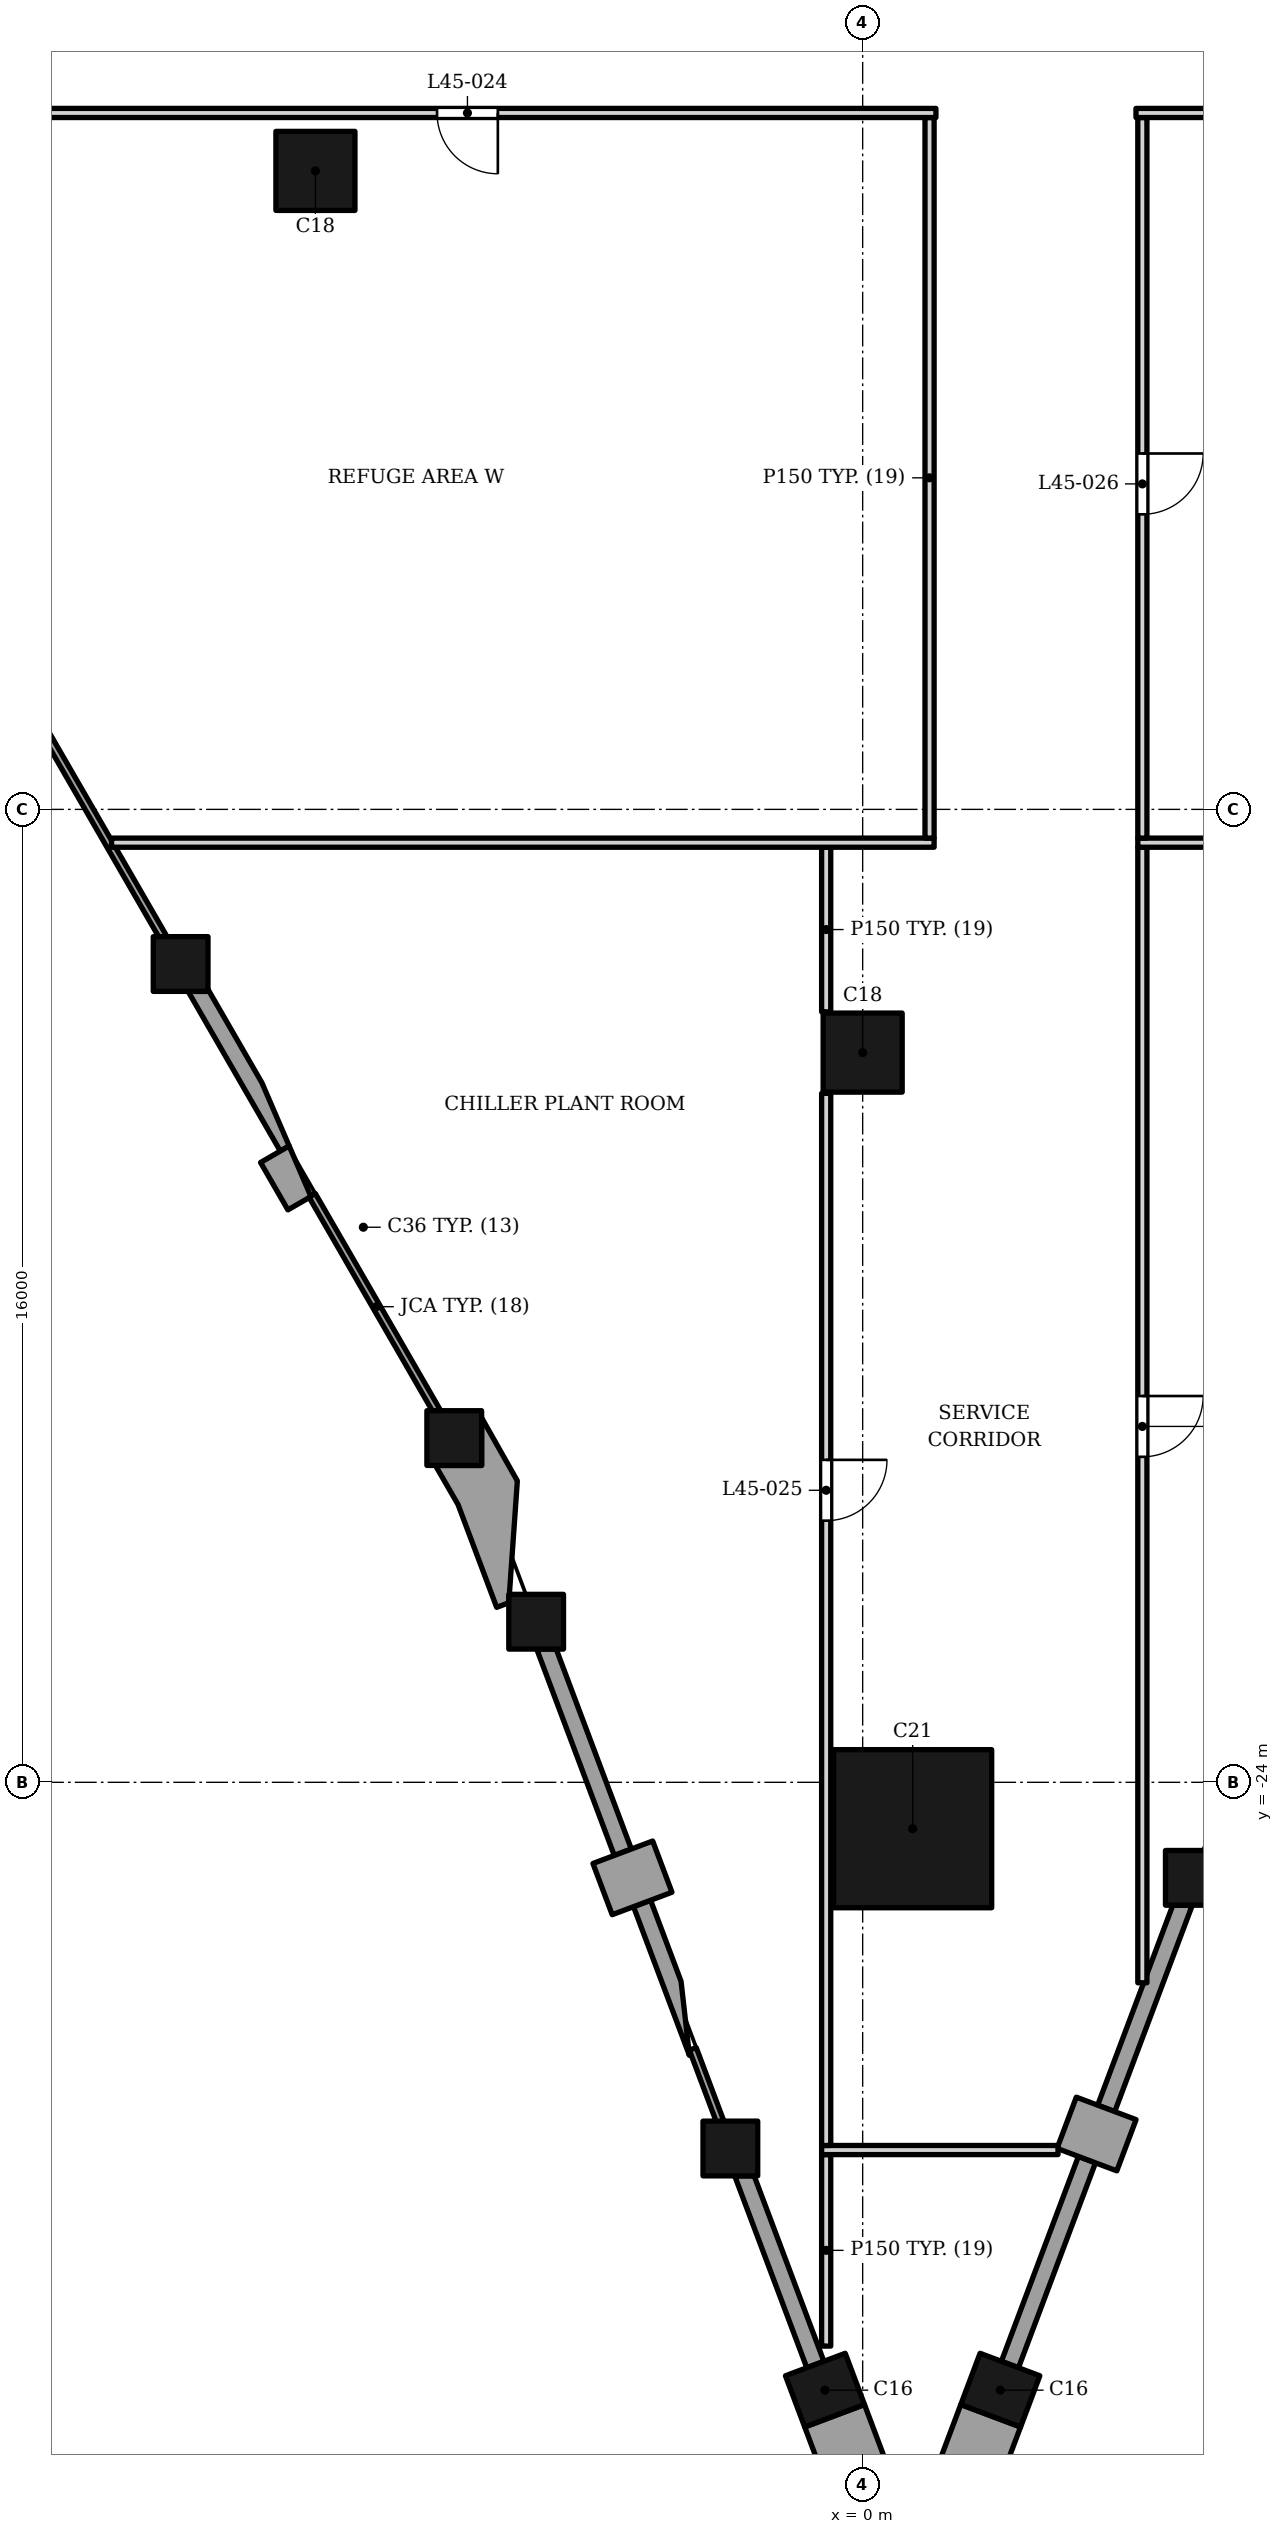
"""IFC4 building model, lengths in metres.
Left out: names, types, materials, properties, quantities, classifications, styles, units other than length and angle.
Written with IfcOpenShell. Run it as: python <this file> out.ifc"""

import sys

from ifc_helpers import new_model, si_unit, direction, frame, frame_2d, origin, origin_2d, place, context, subcontext, project, spatial, polyline, rectangle, outline, extrude, clip, halfspace, element, fill, save


model = new_model("IFC4")
c1 = context("Model", 3, precision=1e-05, world=origin(), true_north=direction((0.0, 1.0)))
c2 = subcontext(c1, "Body", "Model", "MODEL_VIEW")
j1 = project(units=[si_unit("LENGTHUNIT", "METRE"), si_unit("PLANEANGLEUNIT", "RADIAN")], contexts=[c1])
p1 = place(None, origin())
s1 = spatial("IfcSite", under=j1, at=p1, CompositionType="ELEMENT")
p2 = place(p1, origin())
s2 = spatial("IfcBuilding", under=s1, at=p2, CompositionType="ELEMENT")
p3 = place(p2, frame((0.0, 0.0, 191.4)))
s3 = spatial("IfcBuildingStorey", under=s2, at=p3, CompositionType="ELEMENT", Elevation=191.4)
for number, where, z_axis, x_axis in (
    (1, (-0.62, -33.996, 0.0), (0.0, 0.0, 1.0), (0.352, -0.936, 0.0)),
    (2, (2.264, -33.996, 0.0), (0.0, 0.0, 1.0), (0.352, 0.936, 0.0)),
):
    element("IfcColumn", number, at=place(p3, frame(where, z_axis=z_axis, x_axis=x_axis)), inside=s3, PredefinedType="COLUMN", context=c2, shape_type="SweptSolid", body=[
        extrude(rectangle(XDim=0.9, YDim=1.05, at=origin_2d()), origin(), (0.0, 0.0, 1.0), 5.0),
    ])
p4 = place(p3, frame((0.822, -24.763, 0.0), z_axis=(0.0, 0.0, 1.0), x_axis=(0.0, 1.0, 0.0)))
e3 = element("IfcColumn", 3, at=p4, inside=s3, PredefinedType="COLUMN", context=c2, shape_type="SweptSolid", body=[
    extrude(rectangle(XDim=2.6, YDim=2.6, at=origin_2d()), origin(), (0.0, 0.0, 1.0), 5.0),
])
for number, where, z_axis, x_axis in (
    (4, (-9.0, 2.5, 0.0), (0.0, 0.0, 1.0), (1.0, 0.0, 0.0)),
    (5, (0.0, -12.0, 0.0), (0.0, 0.0, 1.0), (1.0, 0.0, 0.0)),
):
    element("IfcColumn", number, at=place(p3, frame(where, z_axis=z_axis, x_axis=x_axis)), inside=s3, PredefinedType="COLUMN", context=c2, shape_type="SweptSolid", body=[
        extrude(rectangle(XDim=1.3, YDim=1.3, at=origin_2d()), origin(), (0.0, 0.0, 1.0), 5.0),
    ])
p5 = place(p3, frame((-11.217, -10.543, 0.0), z_axis=(-0.330179907821, 0.765584946712, 0.55214211743), x_axis=(-0.918242801662, -0.396017874844, 0.0)))
e6 = element("IfcColumn", 6, at=p5, inside=s3, PredefinedType="COLUMN", context=c2, shape_type="Clipping", body=[
    clip(clip(extrude(rectangle(XDim=0.9, YDim=0.9, at=origin_2d()), origin(), (0.0, 0.0, 1.0), 9.056), halfspace(frame((0.0, 0.0, 0.687), z_axis=(0.0, 0.0, 1.0), x_axis=(1.0, 0.0, 0.0)), True)), halfspace(frame((0.0, 0.0, 8.369), z_axis=(0.0, 0.0, 1.0), x_axis=(1.0, 0.0, 0.0)), False)),
])
p6 = place(p3, frame((-6.717, -18.339, 0.0), z_axis=(-0.33011858032, 0.765685342742, 0.552039562746), x_axis=(-0.918288424584, -0.395912072656, 0.0)))
e7 = element("IfcColumn", 7, at=p6, inside=s3, PredefinedType="COLUMN", context=c2, shape_type="Clipping", body=[
    clip(clip(extrude(rectangle(XDim=0.9, YDim=0.9, at=origin_2d()), origin(), (0.0, 0.0, 1.0), 9.057), halfspace(frame((0.0, 0.0, 0.687), z_axis=(0.0, 0.0, 1.0), x_axis=(1.0, 0.0, 0.0)), True)), halfspace(frame((0.0, 0.0, 8.37), z_axis=(0.0, 0.0, 1.0), x_axis=(1.0, 0.0, 0.0)), False)),
])
p7 = place(p3, frame((-5.37, -21.359, 0.0), z_axis=(0.029929407846, 0.396385435949, 0.917596216597), x_axis=(-0.997161566441, 0.075291502926, 0.0)))
e8 = element("IfcColumn", 8, at=p7, inside=s3, PredefinedType="COLUMN", context=c2, shape_type="Clipping", body=[
    clip(clip(extrude(rectangle(XDim=0.9, YDim=0.9, at=origin_2d()), origin(), (0.0, 0.0, 1.0), 5.449), halfspace(frame((0.0, 0.0, 0.199), z_axis=(0.0, 0.0, 1.0), x_axis=(1.0, 0.0, 0.0)), True)), halfspace(frame((0.0, 0.0, 5.25), z_axis=(0.0, 0.0, 1.0), x_axis=(1.0, 0.0, 0.0)), False)),
])
p8 = place(p3, frame((5.43, -25.571, 0.0), z_axis=(0.010188943568, 0.420448971331, 0.90725897512), x_axis=(-0.999706498383, 0.024226371787, 0.0)))
e9 = element("IfcColumn", 9, at=p8, inside=s3, PredefinedType="COLUMN", context=c2, shape_type="Clipping", body=[
    clip(clip(extrude(rectangle(XDim=0.9, YDim=0.9, at=origin_2d()), origin(), (0.0, 0.0, 1.0), 5.511), halfspace(frame((0.0, 0.0, 0.213), z_axis=(0.0, 0.0, 1.0), x_axis=(1.0, 0.0, 0.0)), True)), halfspace(frame((0.0, 0.0, 5.298), z_axis=(0.0, 0.0, 1.0), x_axis=(1.0, 0.0, 0.0)), False)),
])
p9 = place(p3, frame((-2.176, -30.022, 0.0), z_axis=(-0.091048961561, 0.807429818856, 0.582895508836), x_axis=(-0.993702145766, -0.112053761652, 0.0)))
e10 = element("IfcColumn", 10, at=p9, inside=s3, PredefinedType="COLUMN", context=c2, shape_type="Clipping", body=[
    clip(clip(extrude(rectangle(XDim=0.9, YDim=0.9, at=origin_2d()), origin(), (0.0, 0.0, 1.0), 8.578), halfspace(frame((0.0, 0.0, 0.634), z_axis=(0.0, 0.0, 1.0), x_axis=(1.0, 0.0, 0.0)), True)), halfspace(frame((0.0, 0.0, 7.944), z_axis=(0.0, 0.0, 1.0), x_axis=(1.0, 0.0, 0.0)), False)),
])
p10 = place(p3, origin())
e11 = element("IfcWall", 11, at=p10, inside=s3, PredefinedType="SOLIDWALL", context=c2, shape_type="SweptSolid", body=[
    extrude(outline(polyline([(-9.903, -13.807), (-9.453, -14.586), (-9.073, -14.367), (-9.432, -13.535), (-9.903, -13.807)])), origin(), (0.0, 0.0, 1.0), 3.5),
])
p11 = place(p3, origin())
e12 = element("IfcWall", 12, at=p11, inside=s3, PredefinedType="ELEMENTEDWALL", context=c2, shape_type="SweptSolid", body=[
    extrude(outline(polyline([(-9.578, -13.619), (-9.432, -13.535), (-9.881, -12.495), (-10.767, -10.96), (-10.767, -10.993), (-11.094, -10.993), (-9.578, -13.619)])), origin(), (0.0, 0.0, 1.0), 3.5),
])
p12 = place(p3, frame((-3.295, -25.387, 0.0), z_axis=(0.0, 0.0, 1.0), x_axis=(-0.936080509118, -0.351785844584, 0.0)))
e13 = element("IfcWall", 13, at=p12, inside=s3, PredefinedType="SOLIDWALL", context=c2, shape_type="SweptSolid", body=[
    extrude(rectangle(XDim=1.05, YDim=0.9, at=frame_2d((0.525, 0.0))), origin(), (0.0, 0.0, 1.0), 3.5),
])
p13 = place(p3, origin())
e14 = element("IfcWall", 14, at=p13, inside=s3, PredefinedType="ELEMENTEDWALL", context=c2, shape_type="SweptSolid", body=[
    extrude(outline(polyline([(-3.804, -25.097), (-5.04, -21.809), (-5.288, -21.809), (-5.352, -21.833), (-4.085, -25.203), (-3.804, -25.097)])), origin(), (0.0, 0.0, 1.0), 3.5),
])
p14 = place(p3, origin())
e15 = element("IfcWall", 15, at=p14, inside=s3, PredefinedType="ELEMENTEDWALL", context=c2, shape_type="SweptSolid", body=[
    extrude(outline(polyline([(-3.769, -26.045), (-2.849, -28.491), (-2.987, -27.272), (-3.488, -25.94), (-3.769, -26.045)])), origin(), (0.0, 0.0, 1.0), 3.5),
])
p15 = place(p3, origin())
e16 = element("IfcWall", 16, at=p15, inside=s3, PredefinedType="ELEMENTEDWALL", context=c2, shape_type="SweptSolid", body=[
    extrude(outline(polyline([(-0.638, -33.522), (-1.784, -30.472), (-2.105, -30.472), (-0.919, -33.627), (-0.638, -33.522)])), origin(), (0.0, 0.0, 1.0), 3.5),
])
p16 = place(p3, frame((3.355, -29.599, 0.0), z_axis=(0.0, 0.0, 1.0), x_axis=(0.936003928089, -0.351989554676, 0.0)))
e17 = element("IfcWall", 17, at=p16, inside=s3, PredefinedType="SOLIDWALL", context=c2, shape_type="SweptSolid", body=[
    extrude(rectangle(XDim=1.05, YDim=0.9, at=frame_2d((0.525, 0.0))), origin(), (0.0, 0.0, 1.0), 3.5),
])
p17 = place(p3, frame((2.422, -33.575, 0.0), z_axis=(0.0, 0.0, 1.0), x_axis=(0.351769947693, 0.936086483131, 0.0)))
e18 = element("IfcWall", 18, at=p17, inside=s3, PredefinedType="ELEMENTEDWALL", context=c2, shape_type="SweptSolid", body=[
    extrude(rectangle(XDim=3.6, YDim=0.3, at=frame_2d((1.8, 0.0))), origin(), (0.0, 0.0, 1.0), 3.5),
])
p18 = place(p3, origin())
e19 = element("IfcWall", 19, at=p18, inside=s3, PredefinedType="ELEMENTEDWALL", context=c2, shape_type="SweptSolid", body=[
    extrude(outline(polyline([(5.412, -26.045), (5.347, -26.021), (5.101, -26.021), (3.865, -29.31), (4.146, -29.415), (5.412, -26.045)])), origin(), (0.0, 0.0, 1.0), 3.5),
])
p19 = place(p3, origin())
e20 = element("IfcWall", 20, at=p19, inside=s3, PredefinedType="SOLIDWALL", context=c2, shape_type="SweptSolid", body=[
    extrude(outline(polyline([(-5.679, -19.043), (-6.267, -18.004), (-6.267, -18.789), (-7.026, -18.789), (-6.654, -19.433), (-6.019, -21.123), (-5.82, -21.048), (-5.679, -19.043)])), origin(), (0.0, 0.0, 1.0), 3.5),
])
p20 = place(p3, origin())
e21 = element("IfcWall", 21, at=p20, inside=s3, PredefinedType="SOLIDWALL", context=c2, shape_type="SweptSolid", body=[
    extrude(outline(polyline([(0.03, -34.232), (-0.953, -34.602), (-0.175, -36.672), (1.819, -36.672), (2.597, -34.602), (1.614, -34.232), (1.092, -35.622), (0.552, -35.622), (0.03, -34.232)])), origin(), (0.0, 0.0, 1.0), 3.5),
])
p21 = place(p3, frame((-11.439, -10.216, 0.0), z_axis=(0.0, 0.0, 1.0), x_axis=(-0.499992114976, 0.866029956157, 0.0)))
e22 = element("IfcWall", 22, at=p21, inside=s3, PredefinedType="SOLIDWALL", context=c2, shape_type="SweptSolid", body=[
    extrude(rectangle(XDim=4.232, YDim=0.12, at=frame_2d((2.116, 0.0))), origin(), (0.0, 0.0, 1.0), 3.5),
])
p22 = place(p3, frame((-6.938, -18.012, 0.0), z_axis=(0.0, 0.0, 1.0), x_axis=(-0.499997015914, 0.866027126641, 0.0)))
e23 = element("IfcWall", 23, at=p22, inside=s3, PredefinedType="SOLIDWALL", context=c2, shape_type="SweptSolid", body=[
    extrude(rectangle(XDim=4.233, YDim=0.12, at=frame_2d((2.117, 0.0))), origin(), (0.0, 0.0, 1.0), 3.5),
])
p23 = place(p3, frame((-2.322, -29.638, 0.0), z_axis=(0.0, 0.0, 1.0), x_axis=(-0.351802181297, 0.9360743695, 0.0)))
e24 = element("IfcWall", 24, at=p23, inside=s3, PredefinedType="SOLIDWALL", context=c2, shape_type="SweptSolid", body=[
    extrude(rectangle(XDim=1.34, YDim=0.12, at=frame_2d((0.67, 0.0))), origin(), (0.0, 0.0, 1.0), 3.5),
])
p24 = place(p3, frame((-0.6, -33.271, 0.0), z_axis=(0.0, 0.0, 1.0), x_axis=(0.0, 1.0, 0.0)))
e25 = element("IfcWall", 25, at=p24, inside=s3, PredefinedType="PARTITIONING", context=c2, shape_type="SweptSolid", body=[
    extrude(rectangle(XDim=3.149, YDim=0.15, at=frame_2d((1.575, 0.0))), origin(), (0.0, 0.0, 1.0), 4.83),
])
p25 = place(p3, frame((-0.675, -30.047, 0.0), z_axis=(0.0, 0.0, 1.0), x_axis=(1.0, 0.0, 0.0)))
e26 = element("IfcWall", 26, at=p25, inside=s3, PredefinedType="PARTITIONING", context=c2, shape_type="SweptSolid", body=[
    extrude(rectangle(XDim=3.888, YDim=0.15, at=frame_2d((1.944, 0.0))), origin(), (0.0, 0.0, 1.0), 4.83),
])
p26 = place(p3, frame((-0.6, -29.972, 0.0), z_axis=(0.0, 0.0, 1.0), x_axis=(0.0, 1.0, 0.0)))
e27 = element("IfcWall", 27, at=p26, inside=s3, PredefinedType="PARTITIONING", context=c2, shape_type="SweptSolid", body=[
    extrude(rectangle(XDim=17.302, YDim=0.15, at=frame_2d((8.651, 0.0))), origin(), (0.0, 0.0, 1.0), 4.13),
])
p27 = place(p26, frame((10.275, 0.0, 0.0)))
e28 = element("IfcOpeningElement", 28, at=p27, cuts=e27, PredefinedType="OPENING", context=c2, shape_type="SweptSolid", body=[
    extrude(rectangle(XDim=1.0, YDim=2.1, at=frame_2d((0.5, 1.05))), frame((0.0, 0.085, 0.0), z_axis=(0.0, -1.0, 0.0), x_axis=(1.0, 0.0, 0.0)), (0.0, 0.0, 1.0), 0.17),
])
p28 = place(p3, frame((4.6, -27.297, 0.0), z_axis=(0.0, 0.0, 1.0), x_axis=(0.0, 1.0, 0.0)))
e29 = element("IfcWall", 29, at=p28, inside=s3, PredefinedType="PARTITIONING", context=c2, shape_type="SweptSolid", body=[
    extrude(rectangle(XDim=18.674, YDim=0.15, at=frame_2d((9.337, 0.0))), origin(), (0.0, 0.0, 1.0), 3.752),
])
p29 = place(p28, frame((8.649, 0.0, 0.0)))
e30 = element("IfcOpeningElement", 30, at=p29, cuts=e29, PredefinedType="OPENING", context=c2, shape_type="SweptSolid", body=[
    extrude(rectangle(XDim=1.0, YDim=2.1, at=frame_2d((0.5, 1.05))), frame((0.0, 0.085, 0.0), z_axis=(0.0, -1.0, 0.0), x_axis=(1.0, 0.0, 0.0)), (0.0, 0.0, 1.0), 0.17),
])
p30 = place(p3, frame((-0.6, -11.33, 0.0), z_axis=(0.0, 0.0, 1.0), x_axis=(0.0, 1.0, 0.0)))
e31 = element("IfcWall", 31, at=p30, inside=s3, PredefinedType="PARTITIONING", context=c2, shape_type="SweptSolid", body=[
    extrude(rectangle(XDim=2.708, YDim=0.15, at=frame_2d((1.354, 0.0))), origin(), (0.0, 0.0, 1.0), 4.83),
])
p31 = place(p3, frame((-12.353, -8.547, 0.0), z_axis=(0.0, 0.0, 1.0), x_axis=(1.0, 0.0, 0.0)))
e32 = element("IfcWall", 32, at=p31, inside=s3, PredefinedType="PARTITIONING", context=c2, shape_type="SweptSolid", body=[
    extrude(rectangle(XDim=13.528, YDim=0.15, at=frame_2d((6.764, 0.0))), origin(), (0.0, 0.0, 1.0), 3.984),
])
p32 = place(p3, frame((4.525, -8.547, 0.0), z_axis=(0.0, 0.0, 1.0), x_axis=(1.0, 0.0, 0.0)))
e33 = element("IfcWall", 33, at=p32, inside=s3, PredefinedType="PARTITIONING", context=c2, shape_type="SweptSolid", body=[
    extrude(rectangle(XDim=9.472, YDim=0.15, at=frame_2d((4.736, 0.0))), origin(), (0.0, 0.0, 1.0), 3.984),
])
p33 = place(p3, frame((1.1, -8.472, 0.0), z_axis=(0.0, 0.0, 1.0), x_axis=(0.0, 1.0, 0.0)))
e34 = element("IfcWall", 34, at=p33, inside=s3, PredefinedType="PARTITIONING", context=c2, shape_type="SweptSolid", body=[
    extrude(rectangle(XDim=11.85, YDim=0.15, at=frame_2d((5.925, 0.0))), origin(), (0.0, 0.0, 1.0), 4.83),
])
p34 = place(p3, frame((4.6, -8.472, 0.0), z_axis=(0.0, 0.0, 1.0), x_axis=(0.0, 1.0, 0.0)))
e35 = element("IfcWall", 35, at=p34, inside=s3, PredefinedType="PARTITIONING", context=c2, shape_type="SweptSolid", body=[
    extrude(rectangle(XDim=11.85, YDim=0.15, at=frame_2d((5.925, 0.0))), origin(), (0.0, 0.0, 1.0), 3.984),
])
p35 = place(p34, frame((5.325, 0.0, 0.0)))
e36 = element("IfcOpeningElement", 36, at=p35, cuts=e35, PredefinedType="OPENING", context=c2, shape_type="SweptSolid", body=[
    extrude(rectangle(XDim=1.0, YDim=2.1, at=frame_2d((0.5, 1.05))), frame((0.0, 0.085, 0.0), z_axis=(0.0, -1.0, 0.0), x_axis=(1.0, 0.0, 0.0)), (0.0, 0.0, 1.0), 0.17),
])
p36 = place(p3, frame((-19.108, 3.453, 0.0), z_axis=(0.0, 0.0, 1.0), x_axis=(1.0, 0.0, 0.0)))
e37 = element("IfcWall", 37, at=p36, inside=s3, PredefinedType="PARTITIONING", context=c2, shape_type="SweptSolid", body=[
    extrude(rectangle(XDim=20.313, YDim=0.15, at=frame_2d((10.156, 0.0))), origin(), (0.0, 0.0, 1.0), 3.752),
])
p37 = place(p36, frame((12.108, 0.0, 0.0)))
e38 = element("IfcOpeningElement", 38, at=p37, cuts=e37, PredefinedType="OPENING", context=c2, shape_type="SweptSolid", body=[
    extrude(rectangle(XDim=1.0, YDim=2.1, at=frame_2d((0.5, 1.05))), frame((0.0, 0.085, 0.0), z_axis=(0.0, -1.0, 0.0), x_axis=(1.0, 0.0, 0.0)), (0.0, 0.0, 1.0), 0.17),
])
p38 = place(p3, frame((4.495, 3.453, 0.0), z_axis=(0.0, 0.0, 1.0), x_axis=(1.0, 0.0, 0.0)))
e39 = element("IfcWall", 39, at=p38, inside=s3, PredefinedType="PARTITIONING", context=c2, shape_type="SweptSolid", body=[
    extrude(rectangle(XDim=16.257, YDim=0.15, at=frame_2d((8.128, 0.0))), origin(), (0.0, 0.0, 1.0), 3.984),
])
p39 = place(p37, origin())
e40 = element("IfcDoor", 40, at=p39, inside=s3, OperationType="SINGLE_SWING_RIGHT", PredefinedType="DOOR", context=c2, shape_type="SweptSolid", body=[
    extrude(rectangle(XDim=1.0, YDim=2.1, at=frame_2d((0.5, 1.05))), frame((0.0, 0.025, 0.0), z_axis=(0.0, -1.0, 0.0), x_axis=(1.0, 0.0, 0.0)), (0.0, 0.0, 1.0), 0.05),
])
fill(e38, e40)
p40 = place(p27, origin())
e41 = element("IfcDoor", 41, at=p40, inside=s3, OperationType="SINGLE_SWING_RIGHT", PredefinedType="DOOR", context=c2, shape_type="SweptSolid", body=[
    extrude(rectangle(XDim=1.0, YDim=2.1, at=frame_2d((0.5, 1.05))), frame((0.0, 0.025, 0.0), z_axis=(0.0, -1.0, 0.0), x_axis=(1.0, 0.0, 0.0)), (0.0, 0.0, 1.0), 0.05),
])
fill(e28, e41)
p41 = place(p35, origin())
e42 = element("IfcDoor", 42, at=p41, inside=s3, OperationType="SINGLE_SWING_RIGHT", PredefinedType="DOOR", context=c2, shape_type="SweptSolid", body=[
    extrude(rectangle(XDim=1.0, YDim=2.1, at=frame_2d((0.5, 1.05))), frame((0.0, 0.025, 0.0), z_axis=(0.0, -1.0, 0.0), x_axis=(1.0, 0.0, 0.0)), (0.0, 0.0, 1.0), 0.05),
])
fill(e36, e42)
p42 = place(p29, origin())
e43 = element("IfcDoor", 43, at=p42, inside=s3, OperationType="SINGLE_SWING_RIGHT", PredefinedType="DOOR", context=c2, shape_type="SweptSolid", body=[
    extrude(rectangle(XDim=1.0, YDim=2.1, at=frame_2d((0.5, 1.05))), frame((0.0, 0.025, 0.0), z_axis=(0.0, -1.0, 0.0), x_axis=(1.0, 0.0, 0.0)), (0.0, 0.0, 1.0), 0.05),
])
fill(e30, e43)
save(model, sys.argv[1])
